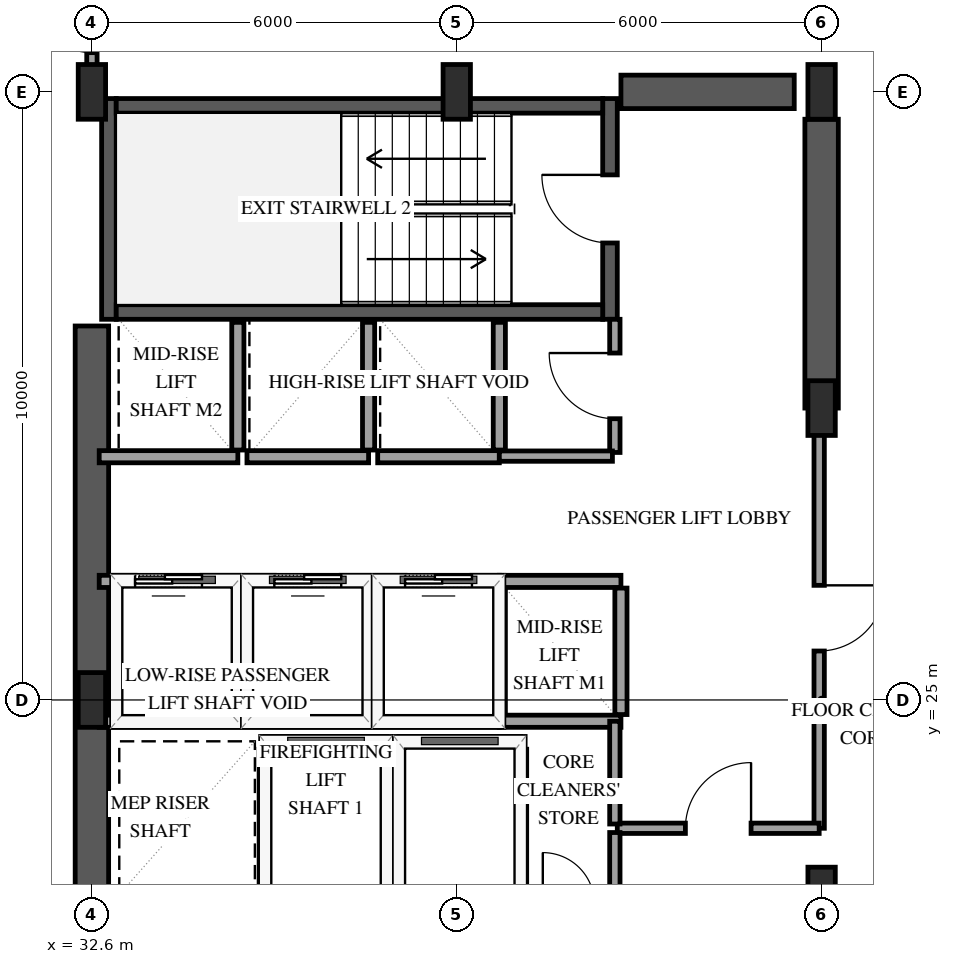
"""IFC4 building model, lengths in metres.
Left out: names, types, materials, properties, quantities, classifications, styles, units other than length and angle.
Written with IfcOpenShell. Run it as: python <this file> out.ifc"""

import sys

from ifc_helpers import new_model, si_unit, direction, frame, frame_2d, origin, origin_2d, place, context, subcontext, project, spatial, rectangle, extrude, element, fill, save


model = new_model("IFC4")
c1 = context("Model", 3, precision=1e-05, world=origin(), true_north=direction((0.0, 1.0)))
c2 = subcontext(c1, "Body", "Model", "MODEL_VIEW")
j1 = project(units=[si_unit("LENGTHUNIT", "METRE"), si_unit("PLANEANGLEUNIT", "RADIAN")], contexts=[c1])
p1 = place(None, origin())
s1 = spatial("IfcSite", under=j1, at=p1, CompositionType="ELEMENT")
p2 = place(p1, origin())
s2 = spatial("IfcBuilding", under=s1, at=p2, CompositionType="ELEMENT")
p3 = place(p2, frame((0.0, 0.0, 103.0)))
s3 = spatial("IfcBuildingStorey", under=s2, at=p3, CompositionType="ELEMENT", Elevation=103.0)
p4 = place(p3, frame((32.88, 31.26, 0.0), z_axis=(0.0, 0.0, 1.0), x_axis=(0.0, 1.0, 0.0)))
e1 = element("IfcWall", 1, at=p4, inside=s3, PredefinedType="SHEAR", context=c2, shape_type="SweptSolid", body=[
    extrude(rectangle(XDim=3.63, YDim=0.24, at=frame_2d((1.815, 0.0))), origin(), (0.0, 0.0, 1.0), 3.9),
])
p5 = place(p3, frame((41.12, 31.26, 0.0), z_axis=(0.0, 0.0, 1.0), x_axis=(0.0, 1.0, 0.0)))
e2 = element("IfcWall", 2, at=p5, inside=s3, PredefinedType="SHEAR", context=c2, shape_type="SweptSolid", body=[
    extrude(rectangle(XDim=3.63, YDim=0.24, at=frame_2d((1.815, 0.0))), origin(), (0.0, 0.0, 1.0), 3.9),
])
p6 = place(p5, frame((1.255, 0.0, 0.0)))
e3 = element("IfcOpeningElement", 3, at=p6, cuts=e2, PredefinedType="OPENING", context=c2, shape_type="SweptSolid", body=[
    extrude(rectangle(XDim=1.12, YDim=2.15, at=frame_2d((0.56, 1.075))), frame((0.0, 0.13, 0.0), z_axis=(0.0, -1.0, 0.0), x_axis=(1.0, 0.0, 0.0)), (0.0, 0.0, 1.0), 0.26),
])
for number, where, z_axis, x_axis in (
    (4, (33.0, 31.38, 0.0), (0.0, 0.0, 1.0), (1.0, 0.0, 0.0)),
    (5, (33.0, 34.77, 0.0), (0.0, 0.0, 1.0), (1.0, 0.0, 0.0)),
):
    element("IfcWall", number, at=place(p3, frame(where, z_axis=z_axis, x_axis=x_axis)), inside=s3, PredefinedType="SHEAR", context=c2, shape_type="SweptSolid", body=[
        extrude(rectangle(XDim=8.0, YDim=0.24, at=frame_2d((4.0, 0.0))), origin(), (0.0, 0.0, 1.0), 3.9),
    ])
p7 = place(p3, frame((32.6, 18.85, 0.0), z_axis=(0.0, 0.0, 1.0), x_axis=(0.0, 1.0, 0.0)))
e6 = element("IfcWall", 6, at=p7, inside=s3, PredefinedType="SHEAR", context=c2, shape_type="SweptSolid", body=[
    extrude(rectangle(XDim=12.3, YDim=0.55, at=frame_2d((6.15, 0.0))), origin(), (0.0, 0.0, 1.0), 3.9),
])
p8 = place(p3, frame((41.3, 35.0, 0.0), z_axis=(0.0, 0.0, 1.0), x_axis=(1.0, 0.0, 0.0)))
e7 = element("IfcWall", 7, at=p8, inside=s3, PredefinedType="SHEAR", context=c2, shape_type="SweptSolid", body=[
    extrude(rectangle(XDim=2.85, YDim=0.55, at=frame_2d((1.425, 0.0))), origin(), (0.0, 0.0, 1.0), 3.9),
])
p9 = place(p3, frame((44.6, 29.8, 0.0), z_axis=(0.0, 0.0, 1.0), x_axis=(0.0, 1.0, 0.0)))
e8 = element("IfcWall", 8, at=p9, inside=s3, PredefinedType="SHEAR", context=c2, shape_type="SweptSolid", body=[
    extrude(rectangle(XDim=4.75, YDim=0.55, at=frame_2d((2.375, 0.0))), origin(), (0.0, 0.0, 1.0), 3.9),
])
for number, where, z_axis, x_axis in (
    (9, (32.6, 25.0, 0.0), (0.0, 0.0, 1.0), (1.0, 0.0, 0.0)),
    (10, (32.6, 35.0, 0.0), (0.0, 0.0, 1.0), (1.0, 0.0, 0.0)),
    (11, (38.6, 35.0, 0.0), (0.0, 0.0, 1.0), (1.0, 0.0, 0.0)),
    (12, (44.6, 21.8, 0.0), (0.0, 0.0, 1.0), (1.0, 0.0, 0.0)),
    (13, (44.6, 29.8, 0.0), (0.0, 0.0, 1.0), (1.0, 0.0, 0.0)),
    (14, (44.6, 35.0, 0.0), (0.0, 0.0, 1.0), (1.0, 0.0, 0.0)),
):
    element("IfcColumn", number, at=place(p3, frame(where, z_axis=z_axis, x_axis=x_axis)), inside=s3, PredefinedType="PILASTER", context=c2, shape_type="SweptSolid", body=[
        extrude(rectangle(XDim=0.45, YDim=0.9, at=origin_2d()), origin(), (0.0, 0.0, 1.0), 3.9),
    ])
p10 = place(p3, frame((35.45, 24.3, 0.0), z_axis=(0.0, 0.0, 1.0), x_axis=(1.0, 0.0, 0.0)))
e15 = element("IfcWall", 15, at=p10, inside=s3, PredefinedType="SOLIDWALL", context=c2, shape_type="SweptSolid", body=[
    extrude(rectangle(XDim=2.0, YDim=0.2, at=frame_2d((1.0, 0.0))), origin(), (0.0, 0.0, 1.0), 3.6),
])
for number, where, z_axis, x_axis in (
    (16, (35.45, 21.81, 0.0), (0.0, 0.0, 1.0), (0.0, 1.0, 0.0)),
    (17, (37.45, 21.81, 0.0), (0.0, 0.0, 1.0), (0.0, 1.0, 0.0)),
):
    element("IfcWall", number, at=place(p3, frame(where, z_axis=z_axis, x_axis=x_axis)), inside=s3, PredefinedType="SOLIDWALL", context=c2, shape_type="SweptSolid", body=[
        extrude(rectangle(XDim=2.38, YDim=0.2, at=frame_2d((1.19, 0.0))), origin(), (0.0, 0.0, 1.0), 3.6),
    ])
p11 = place(p3, frame((37.65, 24.3, 0.0), z_axis=(0.0, 0.0, 1.0), x_axis=(1.0, 0.0, 0.0)))
e18 = element("IfcWall", 18, at=p11, inside=s3, PredefinedType="SOLIDWALL", context=c2, shape_type="SweptSolid", body=[
    extrude(rectangle(XDim=2.0, YDim=0.2, at=frame_2d((1.0, 0.0))), origin(), (0.0, 0.0, 1.0), 3.6),
])
p12 = place(p3, frame((39.65, 21.81, 0.0), z_axis=(0.0, 0.0, 1.0), x_axis=(0.0, 1.0, 0.0)))
e19 = element("IfcWall", 19, at=p12, inside=s3, PredefinedType="SOLIDWALL", context=c2, shape_type="SweptSolid", body=[
    extrude(rectangle(XDim=2.38, YDim=0.2, at=frame_2d((1.19, 0.0))), origin(), (0.0, 0.0, 1.0), 3.6),
])
p13 = place(p3, frame((32.72, 24.65, 0.0), z_axis=(0.0, 0.0, 1.0), x_axis=(1.0, 0.0, 0.0)))
e20 = element("IfcWall", 20, at=p13, inside=s3, PredefinedType="SOLIDWALL", context=c2, shape_type="SweptSolid", body=[
    extrude(rectangle(XDim=2.28, YDim=0.2, at=frame_2d((1.14, 0.0))), origin(), (0.0, 0.0, 1.0), 3.6),
])
p14 = place(p3, frame((32.72, 26.95, 0.0), z_axis=(0.0, 0.0, 1.0), x_axis=(1.0, 0.0, 0.0)))
e21 = element("IfcWall", 21, at=p14, inside=s3, PredefinedType="SOLIDWALL", context=c2, shape_type="SweptSolid", body=[
    extrude(rectangle(XDim=2.28, YDim=0.2, at=frame_2d((1.14, 0.0))), origin(), (0.0, 0.0, 1.0), 3.6),
])
p15 = place(p14, frame((0.59, 0.0, 0.0)))
e22 = element("IfcOpeningElement", 22, at=p15, cuts=e21, PredefinedType="OPENING", context=c2, shape_type="SweptSolid", body=[
    extrude(rectangle(XDim=1.1, YDim=2.15, at=frame_2d((0.55, 1.075))), frame((0.0, 0.11, 0.0), z_axis=(0.0, -1.0, 0.0), x_axis=(1.0, 0.0, 0.0)), (0.0, 0.0, 1.0), 0.22),
])
p16 = place(p3, frame((35.0, 24.76, 0.0), z_axis=(0.0, 0.0, 1.0), x_axis=(0.0, 1.0, 0.0)))
e23 = element("IfcWall", 23, at=p16, inside=s3, PredefinedType="SOLIDWALL", context=c2, shape_type="SweptSolid", body=[
    extrude(rectangle(XDim=2.08, YDim=0.2, at=frame_2d((1.04, 0.0))), origin(), (0.0, 0.0, 1.0), 3.6),
])
p17 = place(p3, frame((35.15, 24.65, 0.0), z_axis=(0.0, 0.0, 1.0), x_axis=(1.0, 0.0, 0.0)))
e24 = element("IfcWall", 24, at=p17, inside=s3, PredefinedType="SOLIDWALL", context=c2, shape_type="SweptSolid", body=[
    extrude(rectangle(XDim=2.0, YDim=0.2, at=frame_2d((1.0, 0.0))), origin(), (0.0, 0.0, 1.0), 3.6),
])
p18 = place(p3, frame((35.15, 26.95, 0.0), z_axis=(0.0, 0.0, 1.0), x_axis=(1.0, 0.0, 0.0)))
e25 = element("IfcWall", 25, at=p18, inside=s3, PredefinedType="SOLIDWALL", context=c2, shape_type="SweptSolid", body=[
    extrude(rectangle(XDim=2.0, YDim=0.2, at=frame_2d((1.0, 0.0))), origin(), (0.0, 0.0, 1.0), 3.6),
])
p19 = place(p18, frame((0.45, 0.0, 0.0)))
e26 = element("IfcOpeningElement", 26, at=p19, cuts=e25, PredefinedType="OPENING", context=c2, shape_type="SweptSolid", body=[
    extrude(rectangle(XDim=1.1, YDim=2.15, at=frame_2d((0.55, 1.075))), frame((0.0, 0.11, 0.0), z_axis=(0.0, -1.0, 0.0), x_axis=(1.0, 0.0, 0.0)), (0.0, 0.0, 1.0), 0.22),
])
p20 = place(p3, frame((37.15, 24.76, 0.0), z_axis=(0.0, 0.0, 1.0), x_axis=(0.0, 1.0, 0.0)))
e27 = element("IfcWall", 27, at=p20, inside=s3, PredefinedType="SOLIDWALL", context=c2, shape_type="SweptSolid", body=[
    extrude(rectangle(XDim=2.08, YDim=0.2, at=frame_2d((1.04, 0.0))), origin(), (0.0, 0.0, 1.0), 3.6),
])
p21 = place(p3, frame((37.3, 24.65, 0.0), z_axis=(0.0, 0.0, 1.0), x_axis=(1.0, 0.0, 0.0)))
e28 = element("IfcWall", 28, at=p21, inside=s3, PredefinedType="SOLIDWALL", context=c2, shape_type="SweptSolid", body=[
    extrude(rectangle(XDim=2.0, YDim=0.2, at=frame_2d((1.0, 0.0))), origin(), (0.0, 0.0, 1.0), 3.6),
])
p22 = place(p3, frame((37.3, 26.95, 0.0), z_axis=(0.0, 0.0, 1.0), x_axis=(1.0, 0.0, 0.0)))
e29 = element("IfcWall", 29, at=p22, inside=s3, PredefinedType="SOLIDWALL", context=c2, shape_type="SweptSolid", body=[
    extrude(rectangle(XDim=2.0, YDim=0.2, at=frame_2d((1.0, 0.0))), origin(), (0.0, 0.0, 1.0), 3.6),
])
p23 = place(p22, frame((0.45, 0.0, 0.0)))
e30 = element("IfcOpeningElement", 30, at=p23, cuts=e29, PredefinedType="OPENING", context=c2, shape_type="SweptSolid", body=[
    extrude(rectangle(XDim=1.1, YDim=2.15, at=frame_2d((0.55, 1.075))), frame((0.0, 0.11, 0.0), z_axis=(0.0, -1.0, 0.0), x_axis=(1.0, 0.0, 0.0)), (0.0, 0.0, 1.0), 0.22),
])
p24 = place(p3, frame((39.3, 24.76, 0.0), z_axis=(0.0, 0.0, 1.0), x_axis=(0.0, 1.0, 0.0)))
e31 = element("IfcWall", 31, at=p24, inside=s3, PredefinedType="SOLIDWALL", context=c2, shape_type="SweptSolid", body=[
    extrude(rectangle(XDim=2.08, YDim=0.2, at=frame_2d((1.04, 0.0))), origin(), (0.0, 0.0, 1.0), 3.6),
])
for number, where, z_axis, x_axis in (
    (32, (39.3, 24.65, 0.0), (0.0, 0.0, 1.0), (1.0, 0.0, 0.0)),
    (33, (39.3, 26.95, 0.0), (0.0, 0.0, 1.0), (1.0, 0.0, 0.0)),
):
    element("IfcWall", number, at=place(p3, frame(where, z_axis=z_axis, x_axis=x_axis)), inside=s3, PredefinedType="SOLIDWALL", context=c2, shape_type="SweptSolid", body=[
        extrude(rectangle(XDim=2.0, YDim=0.2, at=frame_2d((1.0, 0.0))), origin(), (0.0, 0.0, 1.0), 3.6),
    ])
p25 = place(p3, frame((41.3, 24.76, 0.0), z_axis=(0.0, 0.0, 1.0), x_axis=(0.0, 1.0, 0.0)))
e34 = element("IfcWall", 34, at=p25, inside=s3, PredefinedType="SOLIDWALL", context=c2, shape_type="SweptSolid", body=[
    extrude(rectangle(XDim=2.08, YDim=0.2, at=frame_2d((1.04, 0.0))), origin(), (0.0, 0.0, 1.0), 3.6),
])
p26 = place(p3, frame((32.72, 29.0, 0.0), z_axis=(0.0, 0.0, 1.0), x_axis=(1.0, 0.0, 0.0)))
e35 = element("IfcWall", 35, at=p26, inside=s3, PredefinedType="SOLIDWALL", context=c2, shape_type="SweptSolid", body=[
    extrude(rectangle(XDim=2.28, YDim=0.2, at=frame_2d((1.14, 0.0))), origin(), (0.0, 0.0, 1.0), 3.6),
])
p27 = place(p3, frame((35.0, 29.11, 0.0), z_axis=(0.0, 0.0, 1.0), x_axis=(0.0, 1.0, 0.0)))
e36 = element("IfcWall", 36, at=p27, inside=s3, PredefinedType="SOLIDWALL", context=c2, shape_type="SweptSolid", body=[
    extrude(rectangle(XDim=2.1, YDim=0.2, at=frame_2d((1.05, 0.0))), origin(), (0.0, 0.0, 1.0), 3.6),
])
p28 = place(p3, frame((35.15, 29.0, 0.0), z_axis=(0.0, 0.0, 1.0), x_axis=(1.0, 0.0, 0.0)))
e37 = element("IfcWall", 37, at=p28, inside=s3, PredefinedType="SOLIDWALL", context=c2, shape_type="SweptSolid", body=[
    extrude(rectangle(XDim=2.0, YDim=0.2, at=frame_2d((1.0, 0.0))), origin(), (0.0, 0.0, 1.0), 3.6),
])
p29 = place(p3, frame((37.15, 29.11, 0.0), z_axis=(0.0, 0.0, 1.0), x_axis=(0.0, 1.0, 0.0)))
e38 = element("IfcWall", 38, at=p29, inside=s3, PredefinedType="SOLIDWALL", context=c2, shape_type="SweptSolid", body=[
    extrude(rectangle(XDim=2.1, YDim=0.2, at=frame_2d((1.05, 0.0))), origin(), (0.0, 0.0, 1.0), 3.6),
])
p30 = place(p3, frame((37.3, 29.0, 0.0), z_axis=(0.0, 0.0, 1.0), x_axis=(1.0, 0.0, 0.0)))
e39 = element("IfcWall", 39, at=p30, inside=s3, PredefinedType="SOLIDWALL", context=c2, shape_type="SweptSolid", body=[
    extrude(rectangle(XDim=2.0, YDim=0.2, at=frame_2d((1.0, 0.0))), origin(), (0.0, 0.0, 1.0), 3.6),
])
p31 = place(p3, frame((39.3, 29.11, 0.0), z_axis=(0.0, 0.0, 1.0), x_axis=(0.0, 1.0, 0.0)))
e40 = element("IfcWall", 40, at=p31, inside=s3, PredefinedType="SOLIDWALL", context=c2, shape_type="SweptSolid", body=[
    extrude(rectangle(XDim=2.1, YDim=0.2, at=frame_2d((1.05, 0.0))), origin(), (0.0, 0.0, 1.0), 3.6),
])
p32 = place(p3, frame((44.56, 29.8, 0.0), z_axis=(0.0, 0.0, 1.0), x_axis=(0.0, -1.0, 0.0)))
e41 = element("IfcWall", 41, at=p32, inside=s3, PredefinedType="PARTITIONING", context=c2, shape_type="SweptSolid", body=[
    extrude(rectangle(XDim=6.91, YDim=0.17, at=frame_2d((3.455, 0.0))), origin(), (0.0, 0.0, 1.0), 2.64),
])
p33 = place(p32, frame((2.915, 0.0, 0.0)))
e42 = element("IfcOpeningElement", 42, at=p33, cuts=e41, PredefinedType="OPENING", context=c2, shape_type="SweptSolid", body=[
    extrude(rectangle(XDim=1.08, YDim=2.15, at=frame_2d((0.54, 1.075))), frame((0.0, 0.095, 0.0), z_axis=(0.0, -1.0, 0.0), x_axis=(1.0, 0.0, 0.0)), (0.0, 0.0, 1.0), 0.19),
])
p34 = place(p3, frame((41.24, 22.89, 0.0), z_axis=(0.0, 0.0, 1.0), x_axis=(1.0, 0.0, 0.0)))
e43 = element("IfcWall", 43, at=p34, inside=s3, PredefinedType="PARTITIONING", context=c2, shape_type="SweptSolid", body=[
    extrude(rectangle(XDim=3.32, YDim=0.17, at=frame_2d((1.66, 0.0))), origin(), (0.0, 0.0, 1.0), 3.6),
])
p35 = place(p34, frame((1.12, 0.0, 0.0)))
e44 = element("IfcOpeningElement", 44, at=p35, cuts=e43, PredefinedType="OPENING", context=c2, shape_type="SweptSolid", body=[
    extrude(rectangle(XDim=1.08, YDim=2.15, at=frame_2d((0.54, 1.075))), frame((0.0, 0.095, 0.0), z_axis=(0.0, -1.0, 0.0), x_axis=(1.0, 0.0, 0.0)), (0.0, 0.0, 1.0), 0.19),
])
p36 = place(p3, frame((41.2, 29.07, 0.0), z_axis=(0.0, 0.0, 1.0), x_axis=(0.0, 1.0, 0.0)))
e45 = element("IfcWall", 45, at=p36, inside=s3, PredefinedType="PARTITIONING", context=c2, shape_type="SweptSolid", body=[
    extrude(rectangle(XDim=2.19, YDim=0.17, at=frame_2d((1.095, 0.0))), origin(), (0.0, 0.0, 1.0), 3.6),
])
p37 = place(p36, frame((0.555, 0.0, 0.0)))
e46 = element("IfcOpeningElement", 46, at=p37, cuts=e45, PredefinedType="OPENING", context=c2, shape_type="SweptSolid", body=[
    extrude(rectangle(XDim=1.08, YDim=2.15, at=frame_2d((0.54, 1.075))), frame((0.0, 0.095, 0.0), z_axis=(0.0, -1.0, 0.0), x_axis=(1.0, 0.0, 0.0)), (0.0, 0.0, 1.0), 0.19),
])
p38 = place(p3, frame((32.6, 35.07, 0.0), z_axis=(0.0, 0.0, 1.0), x_axis=(0.0, 1.0, 0.0)))
e47 = element("IfcWall", 47, at=p38, inside=s3, PredefinedType="PARTITIONING", context=c2, shape_type="SweptSolid", body=[
    extrude(rectangle(XDim=1.91, YDim=0.17, at=frame_2d((0.955, 0.0))), origin(), (0.0, 0.0, 1.0), 3.6),
])
p39 = place(p38, frame((0.575, 0.0, 0.0)))
e48 = element("IfcOpeningElement", 48, at=p39, cuts=e47, PredefinedType="OPENING", context=c2, shape_type="SweptSolid", body=[
    extrude(rectangle(XDim=0.98, YDim=2.15, at=frame_2d((0.49, 1.075))), frame((0.0, 0.095, 0.0), z_axis=(0.0, -1.0, 0.0), x_axis=(1.0, 0.0, 0.0)), (0.0, 0.0, 1.0), 0.19),
])
p40 = place(p3, frame((39.3, 29.01, 0.0), z_axis=(0.0, 0.0, 1.0), x_axis=(1.0, 0.0, 0.0)))
e49 = element("IfcWall", 49, at=p40, inside=s3, PredefinedType="PARTITIONING", context=c2, shape_type="SweptSolid", body=[
    extrude(rectangle(XDim=1.86, YDim=0.17, at=frame_2d((0.93, 0.0))), origin(), (0.0, 0.0, 1.0), 3.6),
])
p41 = place(p3, frame((41.2, 22.96, 0.0), z_axis=(0.0, 0.0, 1.0), x_axis=(0.0, 1.0, 0.0)))
e50 = element("IfcWall", 50, at=p41, inside=s3, PredefinedType="PARTITIONING", context=c2, shape_type="SweptSolid", body=[
    extrude(rectangle(XDim=1.69, YDim=0.17, at=frame_2d((0.845, 0.0))), origin(), (0.0, 0.0, 1.0), 3.6),
])
p42 = place(p3, frame((41.2, 21.7, 0.0), z_axis=(0.0, 0.0, 1.0), x_axis=(0.0, 1.0, 0.0)))
e51 = element("IfcWall", 51, at=p42, inside=s3, PredefinedType="PARTITIONING", context=c2, shape_type="SweptSolid", body=[
    extrude(rectangle(XDim=1.12, YDim=0.17, at=frame_2d((0.56, 0.0))), origin(), (0.0, 0.0, 1.0), 3.6),
])
p43 = place(p15, origin())
e52 = element("IfcDoor", 52, at=p43, inside=s3, OperationType="SLIDING_TO_LEFT", PredefinedType="DOOR", context=c2, shape_type="SweptSolid", body=[
    extrude(rectangle(XDim=1.1, YDim=2.15, at=frame_2d((0.55, 1.075))), frame((0.0, 0.025, 0.0), z_axis=(0.0, -1.0, 0.0), x_axis=(1.0, 0.0, 0.0)), (0.0, 0.0, 1.0), 0.05),
])
fill(e22, e52)
p44 = place(p19, origin())
e53 = element("IfcDoor", 53, at=p44, inside=s3, OperationType="SLIDING_TO_LEFT", PredefinedType="DOOR", context=c2, shape_type="SweptSolid", body=[
    extrude(rectangle(XDim=1.1, YDim=2.15, at=frame_2d((0.55, 1.075))), frame((0.0, 0.025, 0.0), z_axis=(0.0, -1.0, 0.0), x_axis=(1.0, 0.0, 0.0)), (0.0, 0.0, 1.0), 0.05),
])
fill(e26, e53)
p45 = place(p23, origin())
e54 = element("IfcDoor", 54, at=p45, inside=s3, OperationType="SLIDING_TO_LEFT", PredefinedType="DOOR", context=c2, shape_type="SweptSolid", body=[
    extrude(rectangle(XDim=1.1, YDim=2.15, at=frame_2d((0.55, 1.075))), frame((0.0, 0.025, 0.0), z_axis=(0.0, -1.0, 0.0), x_axis=(1.0, 0.0, 0.0)), (0.0, 0.0, 1.0), 0.05),
])
fill(e30, e54)
p46 = place(p6, origin())
e55 = element("IfcDoor", 55, at=p46, inside=s3, OperationType="SINGLE_SWING_RIGHT", PredefinedType="DOOR", context=c2, shape_type="SweptSolid", body=[
    extrude(rectangle(XDim=1.12, YDim=2.15, at=frame_2d((0.56, 1.075))), frame((0.0, 0.025, 0.0), z_axis=(0.0, -1.0, 0.0), x_axis=(1.0, 0.0, 0.0)), (0.0, 0.0, 1.0), 0.05),
])
fill(e3, e55)
p47 = place(p33, origin())
e56 = element("IfcDoor", 56, at=p47, inside=s3, OperationType="SINGLE_SWING_LEFT", PredefinedType="DOOR", context=c2, shape_type="SweptSolid", body=[
    extrude(rectangle(XDim=1.08, YDim=2.15, at=frame_2d((0.54, 1.075))), frame((0.0, 0.025, 0.0), z_axis=(0.0, -1.0, 0.0), x_axis=(1.0, 0.0, 0.0)), (0.0, 0.0, 1.0), 0.05),
])
fill(e42, e56)
p48 = place(p35, origin())
e57 = element("IfcDoor", 57, at=p48, inside=s3, OperationType="SINGLE_SWING_RIGHT", PredefinedType="DOOR", context=c2, shape_type="SweptSolid", body=[
    extrude(rectangle(XDim=1.08, YDim=2.15, at=frame_2d((0.54, 1.075))), frame((0.0, 0.025, 0.0), z_axis=(0.0, -1.0, 0.0), x_axis=(1.0, 0.0, 0.0)), (0.0, 0.0, 1.0), 0.05),
])
fill(e44, e57)
p49 = place(p37, origin())
e58 = element("IfcDoor", 58, at=p49, inside=s3, OperationType="SINGLE_SWING_RIGHT", PredefinedType="DOOR", context=c2, shape_type="SweptSolid", body=[
    extrude(rectangle(XDim=1.08, YDim=2.15, at=frame_2d((0.54, 1.075))), frame((0.0, 0.025, 0.0), z_axis=(0.0, -1.0, 0.0), x_axis=(1.0, 0.0, 0.0)), (0.0, 0.0, 1.0), 0.05),
])
fill(e46, e58)
p50 = place(p39, origin())
e59 = element("IfcDoor", 59, at=p50, inside=s3, OperationType="SINGLE_SWING_RIGHT", PredefinedType="DOOR", context=c2, shape_type="SweptSolid", body=[
    extrude(rectangle(XDim=0.98, YDim=2.15, at=frame_2d((0.49, 1.075))), frame((0.0, 0.025, 0.0), z_axis=(0.0, -1.0, 0.0), x_axis=(1.0, 0.0, 0.0)), (0.0, 0.0, 1.0), 0.05),
])
fill(e48, e59)
save(model, sys.argv[1])
